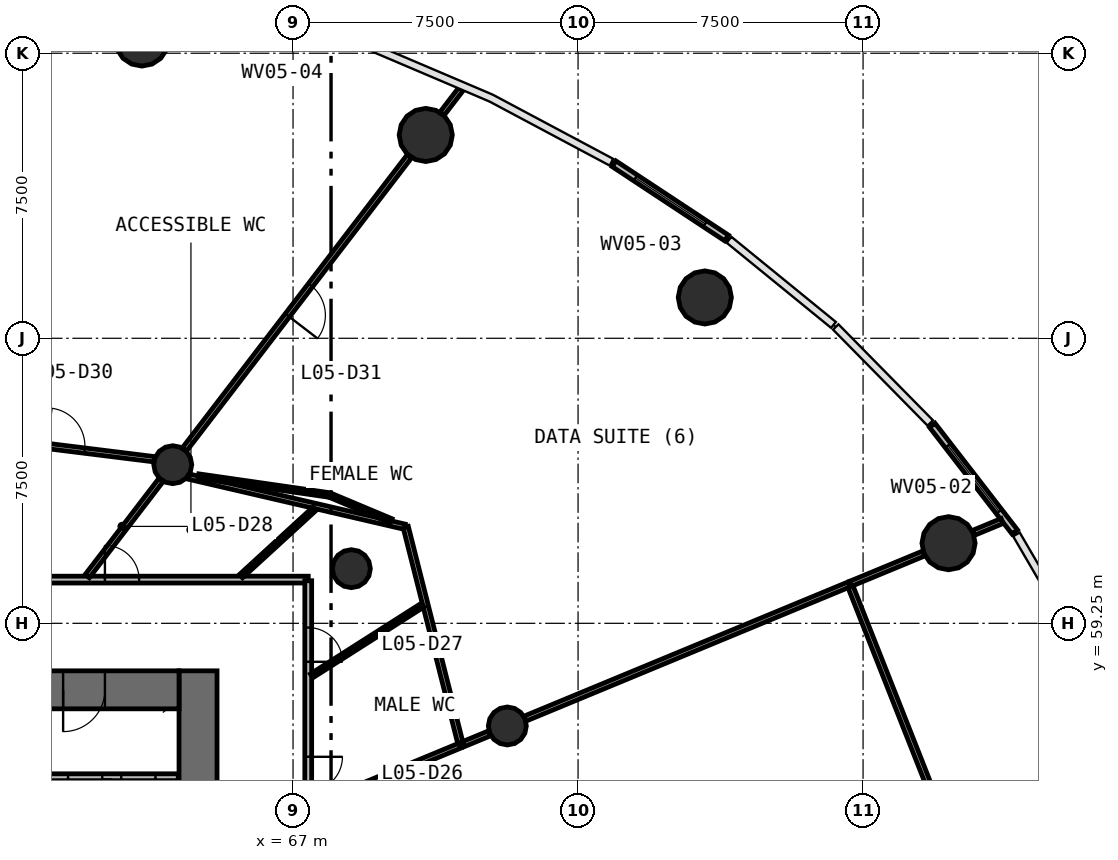
"""IFC4 building model, lengths in metres.
Left out: names, types, materials, properties, quantities, classifications, styles, units other than length and angle.
Written with IfcOpenShell. Run it as: python <this file> out.ifc"""

import sys

from ifc_helpers import new_model, si_unit, direction, frame, frame_2d, origin, origin_2d, place, context, subcontext, project, spatial, rectangle, circle, extrude, source, transform, mapped, element, fill, save


model = new_model("IFC4")
c1 = context("Model", 3, precision=1e-05, world=origin(), true_north=direction((0.0, 1.0)))
c2 = subcontext(c1, "Body", "Model", "MODEL_VIEW")
j1 = project(units=[si_unit("LENGTHUNIT", "METRE"), si_unit("PLANEANGLEUNIT", "RADIAN")], contexts=[c1])
p1 = place(None, origin())
s1 = spatial("IfcSite", under=j1, at=p1, CompositionType="ELEMENT")
p2 = place(p1, origin())
s2 = spatial("IfcBuilding", under=s1, at=p2, CompositionType="ELEMENT")
p3 = place(p2, frame((0.0, 0.0, 22.6)))
s3 = spatial("IfcBuildingStorey", under=s2, at=p3, CompositionType="ELEMENT", Elevation=22.6)
p4 = place(p3, frame((64.5, 38.0, 0.0), z_axis=(0.0, 0.0, 1.0), x_axis=(0.0, 1.0, 0.0)))
e1 = element("IfcWall", 1, at=p4, inside=s3, PredefinedType="SHEAR", context=c2, shape_type="SweptSolid", body=[
    extrude(rectangle(XDim=20.0, YDim=1.0, at=frame_2d((10.0, 0.0))), origin(), (0.0, 0.0, 1.0), 4.4),
])
p5 = place(p4, frame((9.1, 0.0, 0.0)))
e2 = element("IfcOpeningElement", 2, at=p5, cuts=e1, PredefinedType="OPENING", context=c2, shape_type="SweptSolid", body=[
    extrude(rectangle(XDim=1.8, YDim=2.1, at=frame_2d((0.9, 1.05))), frame((0.0, 0.51, 0.0), z_axis=(0.0, -1.0, 0.0), x_axis=(1.0, 0.0, 0.0)), (0.0, 0.0, 1.0), 1.02),
])
p6 = place(p3, frame((64.0, 57.5, 0.0), z_axis=(0.0, 0.0, 1.0), x_axis=(-1.0, 0.0, 0.0)))
e3 = element("IfcWall", 3, at=p6, inside=s3, PredefinedType="SHEAR", context=c2, shape_type="SweptSolid", body=[
    extrude(rectangle(XDim=24.0, YDim=1.0, at=frame_2d((12.0, 0.0))), origin(), (0.0, 0.0, 1.0), 4.4),
])
p7 = place(p6, frame((21.45, 0.0, 0.0)))
e4 = element("IfcOpeningElement", 4, at=p7, cuts=e3, PredefinedType="OPENING", context=c2, shape_type="SweptSolid", body=[
    extrude(rectangle(XDim=1.1, YDim=2.1, at=frame_2d((0.55, 1.05))), frame((0.0, 0.51, 0.0), z_axis=(0.0, -1.0, 0.0), x_axis=(1.0, 0.0, 0.0)), (0.0, 0.0, 1.0), 1.02),
])
p8 = place(p6, frame((1.95, 0.0, 0.0)))
e5 = element("IfcOpeningElement", 5, at=p8, cuts=e3, PredefinedType="OPENING", context=c2, shape_type="SweptSolid", body=[
    extrude(rectangle(XDim=1.1, YDim=2.1, at=frame_2d((0.55, 1.05))), frame((0.0, 0.51, 0.0), z_axis=(0.0, -1.0, 0.0), x_axis=(1.0, 0.0, 0.0)), (0.0, 0.0, 1.0), 1.02),
])
m1 = source(origin(), c2, "Body", "SweptSolid", [
    extrude(circle(Radius=0.7, at=origin_2d()), origin(), (0.0, 0.0, 1.0), 4.4),
])
for number, where, z_axis, x_axis in (
    (6, (84.249, 61.358, 0.0), (0.0, 0.0, 1.0), (1.0, 0.0, 0.0)),
    (7, (77.836, 67.824, 0.0), (0.0, 0.0, 1.0), (1.0, 0.0, 0.0)),
    (8, (70.492, 72.1, 0.0), (0.0, 0.0, 1.0), (1.0, 0.0, 0.0)),
    (9, (63.023, 74.611, 0.0), (0.0, 0.0, 1.0), (1.0, 0.0, 0.0)),
):
    element("IfcColumn", number, at=place(p3, frame(where, z_axis=z_axis, x_axis=x_axis)), inside=s3, PredefinedType="COLUMN", context=c2, shape_type="MappedRepresentation", body=[
        mapped(m1, transform((0.0, 0.0, 0.0), scale=1.0)),
    ])
m2 = source(origin(), c2, "Body", "SweptSolid", [
    extrude(circle(Radius=0.5, at=origin_2d()), origin(), (0.0, 0.0, 1.0), 4.4),
])
for number, where, z_axis, x_axis in (
    (10, (72.639, 56.549, 0.0), (0.0, 0.0, 1.0), (1.0, 0.0, 0.0)),
    (11, (68.535, 60.688, 0.0), (0.0, 0.0, 1.0), (1.0, 0.0, 0.0)),
    (12, (63.835, 63.424, 0.0), (0.0, 0.0, 1.0), (1.0, 0.0, 0.0)),
):
    element("IfcColumn", number, at=place(p3, frame(where, z_axis=z_axis, x_axis=x_axis)), inside=s3, PredefinedType="COLUMN", context=c2, shape_type="MappedRepresentation", body=[
        mapped(m2, transform((0.0, 0.0, 0.0), scale=1.0)),
    ])
p9 = place(p3, frame((85.99, 61.656, 0.0), z_axis=(0.0, 0.0, 1.0), x_axis=(-0.611755109176, 0.791047208703, 0.0)))
e13 = element("IfcWall", 13, at=p9, inside=s3, PredefinedType="STANDARD", context=c2, shape_type="SweptSolid", body=[
    extrude(rectangle(XDim=3.546, YDim=0.18, at=frame_2d((1.773, 0.0))), origin(), (0.0, 0.0, 1.0), 3.698),
])
p10 = place(p9, frame((0.673, 0.0, 0.9)))
e14 = element("IfcOpeningElement", 14, at=p10, cuts=e13, PredefinedType="OPENING", context=c2, shape_type="SweptSolid", body=[
    extrude(rectangle(XDim=2.2, YDim=2.2, at=frame_2d((1.1, 1.1))), frame((0.0, 0.1, 0.0), z_axis=(0.0, -1.0, 0.0), x_axis=(1.0, 0.0, 0.0)), (0.0, 0.0, 1.0), 0.2),
])
p11 = place(p3, frame((78.408, 69.389, 0.0), z_axis=(0.0, 0.0, 1.0), x_axis=(-0.834761908602, 0.550611075031, 0.0)))
e15 = element("IfcWall", 15, at=p11, inside=s3, PredefinedType="STANDARD", context=c2, shape_type="SweptSolid", body=[
    extrude(rectangle(XDim=3.547, YDim=0.18, at=frame_2d((1.773, 0.0))), origin(), (0.0, 0.0, 1.0), 3.95),
])
p12 = place(p11, frame((0.673, 0.0, 0.9)))
e16 = element("IfcOpeningElement", 16, at=p12, cuts=e15, PredefinedType="OPENING", context=c2, shape_type="SweptSolid", body=[
    extrude(rectangle(XDim=2.2, YDim=2.2, at=frame_2d((1.1, 1.1))), frame((0.0, 0.1, 0.0), z_axis=(0.0, -1.0, 0.0), x_axis=(1.0, 0.0, 0.0)), (0.0, 0.0, 1.0), 0.2),
])
p13 = place(p3, frame((36.6, 60.4, 0.0), z_axis=(0.0, 0.0, 1.0), x_axis=(1.0, 0.0, 0.0)))
e17 = element("IfcWall", 17, at=p13, inside=s3, PredefinedType="PARTITIONING", context=c2, shape_type="SweptSolid", body=[
    extrude(rectangle(XDim=30.8, YDim=0.18, at=frame_2d((15.4, 0.0))), origin(), (0.0, 0.0, 1.0), 3.05),
])
p14 = place(p13, frame((25.45, 0.0, 0.0)))
e18 = element("IfcOpeningElement", 18, at=p14, cuts=e17, PredefinedType="OPENING", context=c2, shape_type="SweptSolid", body=[
    extrude(rectangle(XDim=0.9, YDim=2.1, at=frame_2d((0.45, 1.05))), frame((0.0, 0.1, 0.0), z_axis=(0.0, -1.0, 0.0), x_axis=(1.0, 0.0, 0.0)), (0.0, 0.0, 1.0), 0.2),
])
p15 = place(p13, frame((14.95, 0.0, 0.0)))
e19 = element("IfcOpeningElement", 19, at=p15, cuts=e17, PredefinedType="OPENING", context=c2, shape_type="SweptSolid", body=[
    extrude(rectangle(XDim=1.0, YDim=2.1, at=frame_2d((0.5, 1.05))), frame((0.0, 0.1, 0.0), z_axis=(0.0, -1.0, 0.0), x_axis=(1.0, 0.0, 0.0)), (0.0, 0.0, 1.0), 0.2),
])
p16 = place(p13, frame((8.95, 0.0, 0.0)))
e20 = element("IfcOpeningElement", 20, at=p16, cuts=e17, PredefinedType="OPENING", context=c2, shape_type="SweptSolid", body=[
    extrude(rectangle(XDim=1.0, YDim=2.1, at=frame_2d((0.5, 1.05))), frame((0.0, 0.1, 0.0), z_axis=(0.0, -1.0, 0.0), x_axis=(1.0, 0.0, 0.0)), (0.0, 0.0, 1.0), 0.2),
])
p17 = place(p3, frame((67.4, 60.37, 0.0), z_axis=(0.0, 0.0, 1.0), x_axis=(0.0, -1.0, 0.0)))
e21 = element("IfcWall", 21, at=p17, inside=s3, PredefinedType="PARTITIONING", context=c2, shape_type="SweptSolid", body=[
    extrude(rectangle(XDim=23.583, YDim=0.18, at=frame_2d((11.791, 0.0))), origin(), (0.0, 0.0, 1.0), 3.05),
])
p18 = place(p17, frame((11.333, 0.0, 0.0)))
e22 = element("IfcOpeningElement", 22, at=p18, cuts=e21, PredefinedType="OPENING", context=c2, shape_type="SweptSolid", body=[
    extrude(rectangle(XDim=1.0, YDim=2.1, at=frame_2d((0.5, 1.05))), frame((0.0, 0.1, 0.0), z_axis=(0.0, -1.0, 0.0), x_axis=(1.0, 0.0, 0.0)), (0.0, 0.0, 1.0), 0.2),
])
p19 = place(p17, frame((4.633, 0.0, 0.0)))
e23 = element("IfcOpeningElement", 23, at=p19, cuts=e21, PredefinedType="OPENING", context=c2, shape_type="SweptSolid", body=[
    extrude(rectangle(XDim=0.9, YDim=2.1, at=frame_2d((0.45, 1.05))), frame((0.0, 0.1, 0.0), z_axis=(0.0, -1.0, 0.0), x_axis=(1.0, 0.0, 0.0)), (0.0, 0.0, 1.0), 0.2),
])
p20 = place(p17, frame((1.232, 0.0, 0.0)))
e24 = element("IfcOpeningElement", 24, at=p20, cuts=e21, PredefinedType="OPENING", context=c2, shape_type="SweptSolid", body=[
    extrude(rectangle(XDim=0.9, YDim=2.1, at=frame_2d((0.45, 1.05))), frame((0.0, 0.1, 0.0), z_axis=(0.0, -1.0, 0.0), x_axis=(1.0, 0.0, 0.0)), (0.0, 0.0, 1.0), 0.2),
])
p21 = place(p17, frame((14.732, 0.0, 0.0)))
e25 = element("IfcOpeningElement", 25, at=p21, cuts=e21, PredefinedType="OPENING", context=c2, shape_type="SweptSolid", body=[
    extrude(rectangle(XDim=1.0, YDim=2.1, at=frame_2d((0.5, 1.05))), frame((0.0, 0.1, 0.0), z_axis=(0.0, -1.0, 0.0), x_axis=(1.0, 0.0, 0.0)), (0.0, 0.0, 1.0), 0.2),
])
p22 = place(p3, frame((63.98, 55.2, 0.0), z_axis=(0.0, 0.0, 1.0), x_axis=(-1.0, 0.0, 0.0)))
e26 = element("IfcWall", 26, at=p22, inside=s3, PredefinedType="PARTITIONING", context=c2, shape_type="SweptSolid", body=[
    extrude(rectangle(XDim=3.75, YDim=0.18, at=frame_2d((1.875, 0.0))), origin(), (0.0, 0.0, 1.0), 3.95),
])
p23 = place(p22, frame((2.0, 0.0, 0.0)))
e27 = element("IfcOpeningElement", 27, at=p23, cuts=e26, PredefinedType="OPENING", context=c2, shape_type="SweptSolid", body=[
    extrude(rectangle(XDim=0.9, YDim=2.1, at=frame_2d((0.45, 1.05))), frame((0.0, 0.1, 0.0), z_axis=(0.0, -1.0, 0.0), x_axis=(1.0, 0.0, 0.0)), (0.0, 0.0, 1.0), 0.2),
])
p24 = place(p22, frame((0.6, 0.0, 0.0)))
e28 = element("IfcOpeningElement", 28, at=p24, cuts=e26, PredefinedType="OPENING", context=c2, shape_type="SweptSolid", body=[
    extrude(rectangle(XDim=0.9, YDim=2.1, at=frame_2d((0.45, 1.05))), frame((0.0, 0.1, 0.0), z_axis=(0.0, -1.0, 0.0), x_axis=(1.0, 0.0, 0.0)), (0.0, 0.0, 1.0), 0.2),
])
p25 = place(p3, frame((70.064, 71.541, 0.0), z_axis=(0.0, 0.0, 1.0), x_axis=(-0.608770295053, -0.793346537057, 0.0)))
e29 = element("IfcWall", 29, at=p25, inside=s3, PredefinedType="PARTITIONING", context=c2, shape_type="SweptSolid", body=[
    extrude(rectangle(XDim=9.727, YDim=0.14, at=frame_2d((4.864, 0.0))), origin(), (0.0, 0.0, 1.0), 3.05),
])
p26 = place(p25, frame((4.277, 0.0, 0.0)))
e30 = element("IfcOpeningElement", 30, at=p26, cuts=e29, PredefinedType="OPENING", context=c2, shape_type="SweptSolid", body=[
    extrude(rectangle(XDim=1.0, YDim=2.1, at=frame_2d((0.5, 1.05))), frame((0.0, 0.08, 0.0), z_axis=(0.0, -1.0, 0.0), x_axis=(1.0, 0.0, 0.0)), (0.0, 0.0, 1.0), 0.16),
])
p27 = place(p3, frame((73.106, 56.742, 0.0), z_axis=(0.0, 0.0, 1.0), x_axis=(0.923866773136, 0.382714234769, 0.0)))
e31 = element("IfcWall", 31, at=p27, inside=s3, PredefinedType="PARTITIONING", context=c2, shape_type="SweptSolid", body=[
    extrude(rectangle(XDim=9.241, YDim=0.14, at=frame_2d((4.621, 0.0))), origin(), (0.0, 0.0, 1.0), 3.05),
])
p28 = place(p3, frame((84.774, 52.344, 0.0), z_axis=(0.0, 0.0, 1.0), x_axis=(-0.36705286117, 0.930200084448, 0.0)))
e32 = element("IfcWall", 32, at=p28, inside=s3, PredefinedType="PARTITIONING", context=c2, shape_type="SweptSolid", body=[
    extrude(rectangle(XDim=8.46, YDim=0.14, at=frame_2d((4.23, 0.0))), origin(), (0.0, 0.0, 1.0), 3.05),
])
p29 = place(p3, frame((71.417, 56.043, 0.0), z_axis=(0.0, 0.0, 1.0), x_axis=(-0.245211508641, 0.969469605521, 0.0)))
e33 = element("IfcWall", 33, at=p29, inside=s3, PredefinedType="PARTITIONING", context=c2, shape_type="SweptSolid", body=[
    extrude(rectangle(XDim=5.923, YDim=0.14, at=frame_2d((2.961, 0.0))), origin(), (0.0, 0.0, 1.0), 3.05),
])
p30 = place(p3, frame((69.936, 61.792, 0.0), z_axis=(0.0, 0.0, 1.0), x_axis=(-0.974090144773, 0.226160097844, 0.0)))
e34 = element("IfcWall", 34, at=p30, inside=s3, PredefinedType="PARTITIONING", context=c2, shape_type="SweptSolid", body=[
    extrude(rectangle(XDim=5.853, YDim=0.14, at=frame_2d((2.927, 0.0))), origin(), (0.0, 0.0, 1.0), 3.05),
])
p31 = place(p3, frame((58.688, 64.145, 0.0), z_axis=(0.0, 0.0, 1.0), x_axis=(0.992396516621, -0.123081898742, 0.0)))
e35 = element("IfcWall", 35, at=p31, inside=s3, PredefinedType="PARTITIONING", context=c2, shape_type="SweptSolid", body=[
    extrude(rectangle(XDim=4.699, YDim=0.14, at=frame_2d((2.35, 0.0))), origin(), (0.0, 0.0, 1.0), 3.05),
])
p32 = place(p31, frame((1.849, 0.0, 0.0)))
e36 = element("IfcOpeningElement", 36, at=p32, cuts=e35, PredefinedType="OPENING", context=c2, shape_type="SweptSolid", body=[
    extrude(rectangle(XDim=1.0, YDim=2.1, at=frame_2d((0.5, 1.05))), frame((0.0, 0.08, 0.0), z_axis=(0.0, -1.0, 0.0), x_axis=(1.0, 0.0, 0.0)), (0.0, 0.0, 1.0), 0.16),
])
p33 = place(p3, frame((67.49, 54.416, 0.0), z_axis=(0.0, 0.0, 1.0), x_axis=(0.92388430195, 0.382671917718, 0.0)))
e37 = element("IfcWall", 37, at=p33, inside=s3, PredefinedType="PARTITIONING", context=c2, shape_type="SweptSolid", body=[
    extrude(rectangle(XDim=4.221, YDim=0.14, at=frame_2d((2.11, 0.0))), origin(), (0.0, 0.0, 1.0), 3.05),
])
p34 = place(p3, frame((61.584, 60.49, 0.0), z_axis=(0.0, 0.0, 1.0), x_axis=(0.60874605662, 0.793365135703, 0.0)))
e38 = element("IfcWall", 38, at=p34, inside=s3, PredefinedType="PARTITIONING", context=c2, shape_type="SweptSolid", body=[
    extrude(rectangle(XDim=3.194, YDim=0.14, at=frame_2d((1.597, 0.0))), origin(), (0.0, 0.0, 1.0), 3.05),
])
p35 = place(p3, frame((81.671, 60.29, 0.0), z_axis=(0.0, 0.0, 1.0), x_axis=(0.923902679831, 0.382627545012, 0.0)))
e39 = element("IfcWall", 39, at=p35, inside=s3, PredefinedType="PARTITIONING", context=c2, shape_type="SweptSolid", body=[
    extrude(rectangle(XDim=2.085, YDim=0.14, at=frame_2d((1.042, 0.0))), origin(), (0.0, 0.0, 1.0), 3.05),
])
p36 = place(p3, frame((70.921, 72.658, 0.0), z_axis=(0.0, 0.0, 1.0), x_axis=(0.608939798959, 0.793216440351, 0.0)))
e40 = element("IfcWall", 40, at=p36, inside=s3, PredefinedType="PARTITIONING", context=c2, shape_type="SweptSolid", body=[
    extrude(rectangle(XDim=0.827, YDim=0.14, at=frame_2d((0.413, 0.0))), origin(), (0.0, 0.0, 1.0), 3.05),
])
p37 = place(p3, frame((84.9, 61.628, 0.0), z_axis=(0.0, 0.0, 1.0), x_axis=(0.923846977396, 0.382762017913, 0.0)))
e41 = element("IfcWall", 41, at=p37, inside=s3, PredefinedType="PARTITIONING", context=c2, shape_type="SweptSolid", body=[
    extrude(rectangle(XDim=0.823, YDim=0.14, at=frame_2d((0.412, 0.0))), origin(), (0.0, 0.0, 1.0), 3.05),
])
p38 = place(p3, frame((71.483, 56.07, 0.0), z_axis=(0.0, 0.0, 1.0), x_axis=(0.923945120737, 0.382525049986, 0.0)))
e42 = element("IfcWall", 42, at=p38, inside=s3, PredefinedType="PARTITIONING", context=c2, shape_type="SweptSolid", body=[
    extrude(rectangle(XDim=0.747, YDim=0.14, at=frame_2d((0.374, 0.0))), origin(), (0.0, 0.0, 1.0), 3.05),
])
p39 = place(p3, frame((67.961, 62.626, 0.0), z_axis=(0.0, 0.0, 1.0), x_axis=(-0.989753784828, 0.142784611983, 0.0)))
e43 = element("IfcWall", 43, at=p39, inside=s3, PredefinedType="PARTITIONING", context=c2, shape_type="SweptSolid", body=[
    extrude(rectangle(XDim=3.485, YDim=0.12, at=frame_2d((1.742, 0.0))), origin(), (0.0, 0.0, 1.0), 3.05),
])
p40 = place(p3, frame((67.49, 57.868, 0.0), z_axis=(0.0, 0.0, 1.0), x_axis=(0.843371271412, 0.537331274501, 0.0)))
e44 = element("IfcWall", 44, at=p40, inside=s3, PredefinedType="PARTITIONING", context=c2, shape_type="SweptSolid", body=[
    extrude(rectangle(XDim=3.465, YDim=0.12, at=frame_2d((1.733, 0.0))), origin(), (0.0, 0.0, 1.0), 3.05),
])
p41 = place(p3, frame((65.63, 60.49, 0.0), z_axis=(0.0, 0.0, 1.0), x_axis=(0.737304203513, 0.675560886584, 0.0)))
e45 = element("IfcWall", 45, at=p41, inside=s3, PredefinedType="PARTITIONING", context=c2, shape_type="SweptSolid", body=[
    extrude(rectangle(XDim=2.634, YDim=0.12, at=frame_2d((1.317, 0.0))), origin(), (0.0, 0.0, 1.0), 3.05),
])
p42 = place(p3, frame((69.581, 61.946, 0.0), z_axis=(0.0, 0.0, 1.0), x_axis=(-0.922217151055, 0.386672375921, 0.0)))
e46 = element("IfcWall", 46, at=p42, inside=s3, PredefinedType="PARTITIONING", context=c2, shape_type="SweptSolid", body=[
    extrude(rectangle(XDim=1.727, YDim=0.12, at=frame_2d((0.863, 0.0))), origin(), (0.0, 0.0, 1.0), 3.05),
])
m3 = source(origin(), c2, "Body", "SweptSolid", [
    extrude(rectangle(XDim=2.2, YDim=2.2, at=frame_2d((1.1, 1.1))), frame((0.0, 0.03, 0.0), z_axis=(0.0, -1.0, 0.0), x_axis=(1.0, 0.0, 0.0)), (0.0, 0.0, 1.0), 0.06),
])
p43 = place(p10, origin())
e47 = element("IfcWindow", 47, at=p43, inside=s3, PartitioningType="SINGLE_PANEL", PredefinedType="WINDOW", context=c2, shape_type="MappedRepresentation", body=[
    mapped(m3, transform((0.0, 0.0, 0.0), scale=1.0)),
])
fill(e14, e47)
p44 = place(p12, origin())
e48 = element("IfcWindow", 48, at=p44, inside=s3, PartitioningType="SINGLE_PANEL", PredefinedType="WINDOW", context=c2, shape_type="MappedRepresentation", body=[
    mapped(m3, transform((0.0, 0.0, 0.0), scale=1.0)),
])
fill(e16, e48)
m4 = source(origin(), c2, "Body", "SweptSolid", [
    extrude(rectangle(XDim=1.1, YDim=2.1, at=frame_2d((0.55, 1.05))), frame((0.0, 0.025, 0.0), z_axis=(0.0, -1.0, 0.0), x_axis=(1.0, 0.0, 0.0)), (0.0, 0.0, 1.0), 0.05),
])
p45 = place(p8, origin())
e49 = element("IfcDoor", 49, at=p45, inside=s3, OperationType="SINGLE_SWING_RIGHT", PredefinedType="DOOR", context=c2, shape_type="MappedRepresentation", body=[
    mapped(m4, transform((0.0, 0.0, 0.0), scale=1.0)),
])
fill(e5, e49)
m5 = source(origin(), c2, "Body", "SweptSolid", [
    extrude(rectangle(XDim=0.9, YDim=2.1, at=frame_2d((0.45, 1.05))), frame((0.0, 0.025, 0.0), z_axis=(0.0, -1.0, 0.0), x_axis=(1.0, 0.0, 0.0)), (0.0, 0.0, 1.0), 0.05),
])
p46 = place(p19, origin())
e50 = element("IfcDoor", 50, at=p46, inside=s3, OperationType="SINGLE_SWING_LEFT", PredefinedType="DOOR", context=c2, shape_type="MappedRepresentation", body=[
    mapped(m5, transform((0.0, 0.0, 0.0), scale=1.0)),
])
fill(e23, e50)
p47 = place(p20, origin())
e51 = element("IfcDoor", 51, at=p47, inside=s3, OperationType="SINGLE_SWING_RIGHT", PredefinedType="DOOR", context=c2, shape_type="MappedRepresentation", body=[
    mapped(m5, transform((0.0, 0.0, 0.0), scale=1.0)),
])
fill(e24, e51)
p48 = place(p14, origin())
e52 = element("IfcDoor", 52, at=p48, inside=s3, OperationType="SINGLE_SWING_LEFT", PredefinedType="DOOR", context=c2, shape_type="MappedRepresentation", body=[
    mapped(m5, transform((0.0, 0.0, 0.0), scale=1.0)),
])
fill(e18, e52)
m6 = source(origin(), c2, "Body", "SweptSolid", [
    extrude(rectangle(XDim=1.0, YDim=2.1, at=frame_2d((0.5, 1.05))), frame((0.0, 0.025, 0.0), z_axis=(0.0, -1.0, 0.0), x_axis=(1.0, 0.0, 0.0)), (0.0, 0.0, 1.0), 0.05),
])
p49 = place(p32, origin())
e53 = element("IfcDoor", 53, at=p49, inside=s3, OperationType="SINGLE_SWING_LEFT", PredefinedType="DOOR", context=c2, shape_type="MappedRepresentation", body=[
    mapped(m6, transform((0.0, 0.0, 0.0), scale=1.0)),
])
fill(e36, e53)
p50 = place(p26, origin())
e54 = element("IfcDoor", 54, at=p50, inside=s3, OperationType="SINGLE_SWING_RIGHT", PredefinedType="DOOR", context=c2, shape_type="MappedRepresentation", body=[
    mapped(m6, transform((0.0, 0.0, 0.0), scale=1.0)),
])
fill(e30, e54)
m7 = source(origin(), c2, "Body", "SweptSolid", [
    extrude(rectangle(XDim=0.9, YDim=2.1, at=frame_2d((0.45, 1.05))), frame((0.0, 0.025, 0.0), z_axis=(0.0, -1.0, 0.0), x_axis=(1.0, 0.0, 0.0)), (0.0, 0.0, 1.0), 0.05),
])
p51 = place(p23, origin())
e55 = element("IfcDoor", 55, at=p51, inside=s3, OperationType="SINGLE_SWING_RIGHT", PredefinedType="DOOR", context=c2, shape_type="MappedRepresentation", body=[
    mapped(m7, transform((0.0, 0.0, 0.0), scale=1.0)),
])
fill(e27, e55)
p52 = place(p24, origin())
e56 = element("IfcDoor", 56, at=p52, inside=s3, OperationType="SINGLE_SWING_LEFT", PredefinedType="DOOR", context=c2, shape_type="MappedRepresentation", body=[
    mapped(m7, transform((0.0, 0.0, 0.0), scale=1.0)),
])
fill(e28, e56)
save(model, sys.argv[1])
